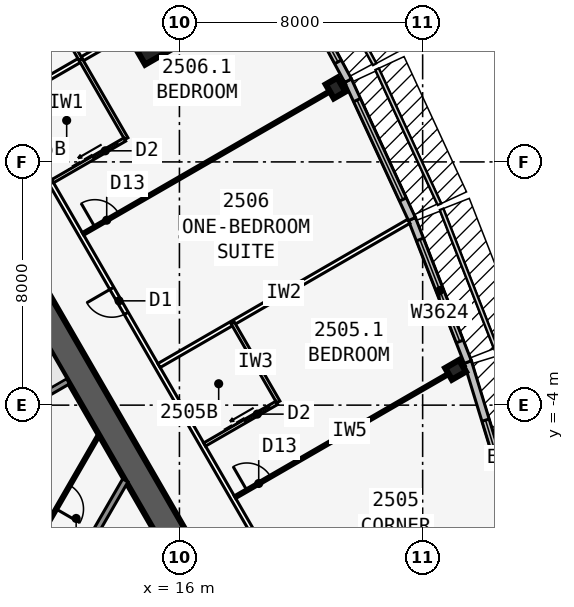
"""IFC4 building model, lengths in metres.
Left out: names, types, materials, properties, quantities, classifications, styles, units other than length and angle.
Written with IfcOpenShell. Run it as: python <this file> out.ifc"""

import sys

from ifc_helpers import new_model, si_unit, direction, frame, frame_2d, origin, origin_2d, place, context, subcontext, project, spatial, rectangle, i_section, extrude, element, fill, save


model = new_model("IFC4")
c1 = context("Model", 3, precision=1e-05, world=origin(), true_north=direction((0.0, 1.0)))
c2 = subcontext(c1, "Body", "Model", "MODEL_VIEW")
j1 = project(units=[si_unit("LENGTHUNIT", "METRE"), si_unit("PLANEANGLEUNIT", "RADIAN")], contexts=[c1])
p1 = place(None, origin())
s1 = spatial("IfcSite", under=j1, at=p1, CompositionType="ELEMENT")
p2 = place(p1, origin())
s2 = spatial("IfcBuilding", under=s1, at=p2, CompositionType="ELEMENT")
p3 = place(p2, frame((0.0, 0.0, 96.5)))
s3 = spatial("IfcBuildingStorey", under=s2, at=p3, CompositionType="ELEMENT", Elevation=96.5)
p4 = place(p3, frame((16.5, -9.526, 0.0), z_axis=(0.0, 0.0, 1.0), x_axis=(-0.499999749417, 0.866025548458, 0.0)))
e1 = element("IfcWall", 1, at=p4, inside=s3, PredefinedType="SHEAR", context=c2, shape_type="SweptSolid", body=[
    extrude(rectangle(XDim=33.0, YDim=0.9, at=frame_2d((16.5, 0.0))), origin(), (0.0, 0.0, 1.0), 3.4),
])
p5 = place(p4, frame((14.15, 0.0, 0.0)))
e2 = element("IfcOpeningElement", 2, at=p5, cuts=e1, PredefinedType="OPENING", context=c2, shape_type="SweptSolid", body=[
    extrude(rectangle(XDim=1.8, YDim=2.13, at=frame_2d((0.9, 1.065))), frame((0.0, 0.46, 0.0), z_axis=(0.0, -1.0, 0.0), x_axis=(1.0, 0.0, 0.0)), (0.0, 0.0, 1.0), 0.92),
])
p6 = place(p4, frame((12.6, 0.0, 0.0)))
e3 = element("IfcOpeningElement", 3, at=p6, cuts=e1, PredefinedType="OPENING", context=c2, shape_type="SweptSolid", body=[
    extrude(rectangle(XDim=1.0, YDim=2.13, at=frame_2d((0.5, 1.065))), frame((0.0, 0.46, 0.0), z_axis=(0.0, -1.0, 0.0), x_axis=(1.0, 0.0, 0.0)), (0.0, 0.0, 1.0), 0.92),
])
p7 = place(p3, frame((9.629, -4.775, 0.0), z_axis=(0.0, 0.0, 1.0), x_axis=(0.866022959057, 0.500004234368, 0.0)))
e4 = element("IfcWall", 4, at=p7, inside=s3, PredefinedType="SOLIDWALL", context=c2, shape_type="SweptSolid", body=[
    extrude(rectangle(XDim=3.125, YDim=0.2, at=frame_2d((1.562, 0.0))), origin(), (0.0, 0.0, 1.0), 3.235),
])
for number, where, z_axis, x_axis in (
    (5, (25.083, -2.839, 0.0), (0.0, 0.0, 1.0), (-0.5, 0.866, 0.0)),
    (6, (21.137, 6.43, 0.0), (0.0, 0.0, 1.0), (0.866, 0.5, 0.0)),
):
    element("IfcColumn", number, at=place(p3, frame(where, z_axis=z_axis, x_axis=x_axis)), inside=s3, PredefinedType="COLUMN", context=c2, shape_type="SweptSolid", body=[
        extrude(i_section(OverallWidth=0.442, OverallDepth=0.531, WebThickness=0.066, FlangeThickness=0.106, at=origin_2d()), origin(), (0.0, 0.0, 1.0), 3.4),
    ])
p8 = place(p3, frame((15.312, 8.84, 0.0), z_axis=(0.0, 0.0, 1.0), x_axis=(0.866025403784, 0.5, 0.0)))
e7 = element("IfcColumn", 7, at=p8, inside=s3, PredefinedType="COLUMN", context=c2, shape_type="SweptSolid", body=[
    extrude(rectangle(XDim=2.4, YDim=2.4, at=origin_2d()), origin(), (0.0, 0.0, 1.0), 3.4),
])
p9 = place(p3, frame((27.88, -10.429, 0.0), z_axis=(0.0, 0.0, 1.0), x_axis=(-0.2919790669, 0.956424709265, 0.0)))
e8 = element("IfcWall", 8, at=p9, inside=s3, PredefinedType="STANDARD", context=c2, shape_type="SweptSolid", body=[
    extrude(rectangle(XDim=8.211, YDim=0.25, at=frame_2d((4.105, 0.0))), origin(), (0.0, 0.0, 1.0), 3.235),
])
p10 = place(p9, frame((2.006, 0.0, 0.45)))
e9 = element("IfcOpeningElement", 9, at=p10, cuts=e8, PredefinedType="OPENING", context=c2, shape_type="SweptSolid", body=[
    extrude(rectangle(XDim=4.2, YDim=2.4, at=frame_2d((2.1, 1.2))), frame((0.0, 0.135, 0.0), z_axis=(0.0, -1.0, 0.0), x_axis=(1.0, 0.0, 0.0)), (0.0, 0.0, 1.0), 0.27),
])
p11 = place(p3, frame((25.486, -2.584, 0.0), z_axis=(0.0, 0.0, 1.0), x_axis=(-0.364013463868, 0.931393685894, 0.0)))
e10 = element("IfcWall", 10, at=p11, inside=s3, PredefinedType="STANDARD", context=c2, shape_type="SweptSolid", body=[
    extrude(rectangle(XDim=5.058, YDim=0.25, at=frame_2d((2.529, 0.0))), origin(), (0.0, 0.0, 1.0), 3.235),
])
p12 = place(p11, frame((0.729, 0.0, 0.45)))
e11 = element("IfcOpeningElement", 11, at=p12, cuts=e10, PredefinedType="OPENING", context=c2, shape_type="SweptSolid", body=[
    extrude(rectangle(XDim=3.6, YDim=2.4, at=frame_2d((1.8, 1.2))), frame((0.0, 0.135, 0.0), z_axis=(0.0, -1.0, 0.0), x_axis=(1.0, 0.0, 0.0)), (0.0, 0.0, 1.0), 0.27),
])
p13 = place(p3, frame((23.648, 2.119, 0.0), z_axis=(0.0, 0.0, 1.0), x_axis=(-0.419203100754, 0.907892482796, 0.0)))
e12 = element("IfcWall", 12, at=p13, inside=s3, PredefinedType="STANDARD", context=c2, shape_type="SweptSolid", body=[
    extrude(rectangle(XDim=5.021, YDim=0.25, at=frame_2d((2.51, 0.0))), origin(), (0.0, 0.0, 1.0), 3.235),
])
p14 = place(p13, frame((0.71, 0.0, 0.45)))
e13 = element("IfcOpeningElement", 13, at=p14, cuts=e12, PredefinedType="OPENING", context=c2, shape_type="SweptSolid", body=[
    extrude(rectangle(XDim=3.6, YDim=2.4, at=frame_2d((1.8, 1.2))), frame((0.0, 0.135, 0.0), z_axis=(0.0, -1.0, 0.0), x_axis=(1.0, 0.0, 0.0)), (0.0, 0.0, 1.0), 0.27),
])
p15 = place(p3, frame((21.547, 6.671, 0.0), z_axis=(0.0, 0.0, 1.0), x_axis=(-0.473412820489, 0.880840678782, 0.0)))
e14 = element("IfcWall", 14, at=p15, inside=s3, PredefinedType="STANDARD", context=c2, shape_type="SweptSolid", body=[
    extrude(rectangle(XDim=5.002, YDim=0.25, at=frame_2d((2.501, 0.0))), origin(), (0.0, 0.0, 1.0), 3.235),
])
p16 = place(p15, frame((0.701, 0.0, 0.45)))
e15 = element("IfcOpeningElement", 15, at=p16, cuts=e14, PredefinedType="OPENING", context=c2, shape_type="SweptSolid", body=[
    extrude(rectangle(XDim=3.6, YDim=2.4, at=frame_2d((1.8, 1.2))), frame((0.0, 0.135, 0.0), z_axis=(0.0, -1.0, 0.0), x_axis=(1.0, 0.0, 0.0)), (0.0, 0.0, 1.0), 0.27),
])
p17 = place(p3, frame((20.027, -10.985, 0.0), z_axis=(0.0, 0.0, 1.0), x_axis=(-0.500001677587, 0.866024435227, 0.0)))
e16 = element("IfcWall", 16, at=p17, inside=s3, PredefinedType="PARTITIONING", context=c2, shape_type="SweptSolid", body=[
    extrude(rectangle(XDim=39.054, YDim=0.15, at=frame_2d((19.527, 0.0))), origin(), (0.0, 0.0, 1.0), 3.235),
])
p18 = place(p17, frame((1.558, 0.0, 0.0)))
e17 = element("IfcOpeningElement", 17, at=p18, cuts=e16, PredefinedType="OPENING", context=c2, shape_type="SweptSolid", body=[
    extrude(rectangle(XDim=0.95, YDim=2.13, at=frame_2d((0.475, 1.065))), frame((0.0, 0.085, 0.0), z_axis=(0.0, -1.0, 0.0), x_axis=(1.0, 0.0, 0.0)), (0.0, 0.0, 1.0), 0.17),
])
p19 = place(p17, frame((11.552, 0.0, 0.0)))
e18 = element("IfcOpeningElement", 18, at=p19, cuts=e16, PredefinedType="OPENING", context=c2, shape_type="SweptSolid", body=[
    extrude(rectangle(XDim=0.95, YDim=2.13, at=frame_2d((0.475, 1.065))), frame((0.0, 0.085, 0.0), z_axis=(0.0, -1.0, 0.0), x_axis=(1.0, 0.0, 0.0)), (0.0, 0.0, 1.0), 0.17),
])
p20 = place(p17, frame((22.752, 0.0, 0.0)))
e19 = element("IfcOpeningElement", 19, at=p20, cuts=e16, PredefinedType="OPENING", context=c2, shape_type="SweptSolid", body=[
    extrude(rectangle(XDim=0.95, YDim=2.13, at=frame_2d((0.475, 1.065))), frame((0.0, 0.085, 0.0), z_axis=(0.0, -1.0, 0.0), x_axis=(1.0, 0.0, 0.0)), (0.0, 0.0, 1.0), 0.17),
])
p21 = place(p17, frame((36.546, 0.0, 0.0)))
e20 = element("IfcOpeningElement", 20, at=p21, cuts=e16, PredefinedType="OPENING", context=c2, shape_type="SweptSolid", body=[
    extrude(rectangle(XDim=0.95, YDim=2.13, at=frame_2d((0.475, 1.065))), frame((0.0, 0.085, 0.0), z_axis=(0.0, -1.0, 0.0), x_axis=(1.0, 0.0, 0.0)), (0.0, 0.0, 1.0), 0.17),
])
p22 = place(p3, frame((17.829, -7.027, 0.0), z_axis=(0.0, 0.0, 1.0), x_axis=(0.866032659912, 0.499987431809, 0.0)))
e21 = element("IfcWall", 21, at=p22, inside=s3, PredefinedType="PARTITIONING", context=c2, shape_type="SweptSolid", body=[
    extrude(rectangle(XDim=8.72, YDim=0.1, at=frame_2d((4.36, 0.0))), origin(), (0.0, 0.0, 1.0), 2.389),
])
p23 = place(p22, frame((0.45, 0.0, 0.0)))
e22 = element("IfcOpeningElement", 22, at=p23, cuts=e21, PredefinedType="OPENING", context=c2, shape_type="SweptSolid", body=[
    extrude(rectangle(XDim=0.9, YDim=2.13, at=frame_2d((0.45, 1.065))), frame((0.0, 0.06, 0.0), z_axis=(0.0, -1.0, 0.0), x_axis=(1.0, 0.0, 0.0)), (0.0, 0.0, 1.0), 0.12),
])
p24 = place(p3, frame((15.329, -2.697, 0.0), z_axis=(0.0, 0.0, 1.0), x_axis=(0.866018409083, 0.500012114982, 0.0)))
e23 = element("IfcWall", 23, at=p24, inside=s3, PredefinedType="PARTITIONING", context=c2, shape_type="SweptSolid", body=[
    extrude(rectangle(XDim=9.485, YDim=0.15, at=frame_2d((4.742, 0.0))), origin(), (0.0, 0.0, 1.0), 2.389),
])
p25 = place(p3, frame((12.829, 1.633, 0.0), z_axis=(0.0, 0.0, 1.0), x_axis=(0.866026934769, 0.499997348248, 0.0)))
e24 = element("IfcWall", 24, at=p25, inside=s3, PredefinedType="PARTITIONING", context=c2, shape_type="SweptSolid", body=[
    extrude(rectangle(XDim=9.943, YDim=0.1, at=frame_2d((4.971, 0.0))), origin(), (0.0, 0.0, 1.0), 2.389),
])
p26 = place(p25, frame((0.45, 0.0, 0.0)))
e25 = element("IfcOpeningElement", 25, at=p26, cuts=e24, PredefinedType="OPENING", context=c2, shape_type="SweptSolid", body=[
    extrude(rectangle(XDim=0.9, YDim=2.13, at=frame_2d((0.45, 1.065))), frame((0.0, 0.06, 0.0), z_axis=(0.0, -1.0, 0.0), x_axis=(1.0, 0.0, 0.0)), (0.0, 0.0, 1.0), 0.12),
])
p27 = place(p3, frame((10.329, 5.963, 0.0), z_axis=(0.0, 0.0, 1.0), x_axis=(0.866021688545, 0.500006434927, 0.0)))
e26 = element("IfcWall", 26, at=p27, inside=s3, PredefinedType="PARTITIONING", context=c2, shape_type="SweptSolid", body=[
    extrude(rectangle(XDim=10.096, YDim=0.15, at=frame_2d((5.048, 0.0))), origin(), (0.0, 0.0, 1.0), 2.389),
])
p28 = place(p3, frame((19.253, -3.895, 0.0), z_axis=(0.0, 0.0, 1.0), x_axis=(-0.499990139034, 0.866031096941, 0.0)))
e27 = element("IfcWall", 27, at=p28, inside=s3, PredefinedType="PLUMBINGWALL", context=c2, shape_type="SweptSolid", body=[
    extrude(rectangle(XDim=3.0, YDim=0.12, at=frame_2d((1.5, 0.0))), origin(), (0.0, 0.0, 1.0), 3.235),
])
p29 = place(p3, frame((16.829, -5.295, 0.0), z_axis=(0.0, 0.0, 1.0), x_axis=(0.866035715982, 0.499982138324, 0.0)))
e28 = element("IfcWall", 28, at=p29, inside=s3, PredefinedType="PLUMBINGWALL", context=c2, shape_type="SweptSolid", body=[
    extrude(rectangle(XDim=2.74, YDim=0.12, at=frame_2d((1.37, 0.0))), origin(), (0.0, 0.0, 1.0), 3.235),
])
p30 = place(p29, frame((1.55, 0.0, 0.0)))
e29 = element("IfcOpeningElement", 29, at=p30, cuts=e28, PredefinedType="OPENING", context=c2, shape_type="SweptSolid", body=[
    extrude(rectangle(XDim=0.9, YDim=2.13, at=frame_2d((0.45, 1.065))), frame((0.0, 0.07, 0.0), z_axis=(0.0, -1.0, 0.0), x_axis=(1.0, 0.0, 0.0)), (0.0, 0.0, 1.0), 0.14),
])
p31 = place(p3, frame((14.253, 4.765, 0.0), z_axis=(0.0, 0.0, 1.0), x_axis=(-0.50002537861, 0.866010750942, 0.0)))
e30 = element("IfcWall", 30, at=p31, inside=s3, PredefinedType="PLUMBINGWALL", context=c2, shape_type="SweptSolid", body=[
    extrude(rectangle(XDim=3.0, YDim=0.12, at=frame_2d((1.5, 0.0))), origin(), (0.0, 0.0, 1.0), 3.235),
])
p32 = place(p3, frame((11.829, 3.365, 0.0), z_axis=(0.0, 0.0, 1.0), x_axis=(0.865997131366, 0.500048966069, 0.0)))
e31 = element("IfcWall", 31, at=p32, inside=s3, PredefinedType="PLUMBINGWALL", context=c2, shape_type="SweptSolid", body=[
    extrude(rectangle(XDim=2.74, YDim=0.12, at=frame_2d((1.37, 0.0))), origin(), (0.0, 0.0, 1.0), 3.235),
])
p33 = place(p32, frame((1.55, 0.0, 0.0)))
e32 = element("IfcOpeningElement", 32, at=p33, cuts=e31, PredefinedType="OPENING", context=c2, shape_type="SweptSolid", body=[
    extrude(rectangle(XDim=0.9, YDim=2.13, at=frame_2d((0.45, 1.065))), frame((0.0, 0.07, 0.0), z_axis=(0.0, -1.0, 0.0), x_axis=(1.0, 0.0, 0.0)), (0.0, 0.0, 1.0), 0.14),
])
p34 = place(p3, frame((12.753, 7.363, 0.0), z_axis=(0.0, 0.0, 1.0), x_axis=(-0.499990139034, 0.866031096941, 0.0)))
e33 = element("IfcWall", 33, at=p34, inside=s3, PredefinedType="PLUMBINGWALL", context=c2, shape_type="SweptSolid", body=[
    extrude(rectangle(XDim=3.0, YDim=0.12, at=frame_2d((1.5, 0.0))), origin(), (0.0, 0.0, 1.0), 3.235),
])
p35 = place(p3, frame((14.219, -6.476, 0.0), z_axis=(0.0, 0.0, 1.0), x_axis=(-0.499952404951, -0.866052881055, 0.0)))
e34 = element("IfcWall", 34, at=p35, inside=s3, PredefinedType="SOLIDWALL", context=c2, shape_type="SweptSolid", body=[
    extrude(rectangle(XDim=3.002, YDim=0.2, at=frame_2d((1.501, 0.0))), origin(), (0.0, 0.0, 1.0), 3.235),
])
p36 = place(p3, frame((13.354, -4.976, 0.0), z_axis=(0.0, 0.0, 1.0), x_axis=(-0.499999210213, -0.866025859768, 0.0)))
e35 = element("IfcWall", 35, at=p36, inside=s3, PredefinedType="PARTITIONING", context=c2, shape_type="SweptSolid", body=[
    extrude(rectangle(XDim=4.734, YDim=0.1, at=frame_2d((2.367, 0.0))), origin(), (0.0, 0.0, 1.0), 3.235),
])
p37 = place(p36, frame((1.917, 0.0, 0.0)))
e36 = element("IfcOpeningElement", 36, at=p37, cuts=e35, PredefinedType="OPENING", context=c2, shape_type="SweptSolid", body=[
    extrude(rectangle(XDim=0.9, YDim=2.13, at=frame_2d((0.45, 1.065))), frame((0.0, 0.06, 0.0), z_axis=(0.0, -1.0, 0.0), x_axis=(1.0, 0.0, 0.0)), (0.0, 0.0, 1.0), 0.12),
])
p38 = place(p10, origin())
e37 = element("IfcWindow", 37, at=p38, inside=s3, PartitioningType="SINGLE_PANEL", PredefinedType="WINDOW", context=c2, shape_type="SweptSolid", body=[
    extrude(rectangle(XDim=4.2, YDim=2.4, at=frame_2d((2.1, 1.2))), frame((0.0, 0.03, 0.0), z_axis=(0.0, -1.0, 0.0), x_axis=(1.0, 0.0, 0.0)), (0.0, 0.0, 1.0), 0.06),
])
fill(e9, e37)
p39 = place(p12, origin())
e38 = element("IfcWindow", 38, at=p39, inside=s3, PartitioningType="SINGLE_PANEL", PredefinedType="WINDOW", context=c2, shape_type="SweptSolid", body=[
    extrude(rectangle(XDim=3.6, YDim=2.4, at=frame_2d((1.8, 1.2))), frame((0.0, 0.03, 0.0), z_axis=(0.0, -1.0, 0.0), x_axis=(1.0, 0.0, 0.0)), (0.0, 0.0, 1.0), 0.06),
])
fill(e11, e38)
p40 = place(p14, origin())
e39 = element("IfcWindow", 39, at=p40, inside=s3, PartitioningType="SINGLE_PANEL", PredefinedType="WINDOW", context=c2, shape_type="SweptSolid", body=[
    extrude(rectangle(XDim=3.6, YDim=2.4, at=frame_2d((1.8, 1.2))), frame((0.0, 0.03, 0.0), z_axis=(0.0, -1.0, 0.0), x_axis=(1.0, 0.0, 0.0)), (0.0, 0.0, 1.0), 0.06),
])
fill(e13, e39)
p41 = place(p16, origin())
e40 = element("IfcWindow", 40, at=p41, inside=s3, PartitioningType="SINGLE_PANEL", PredefinedType="WINDOW", context=c2, shape_type="SweptSolid", body=[
    extrude(rectangle(XDim=3.6, YDim=2.4, at=frame_2d((1.8, 1.2))), frame((0.0, 0.03, 0.0), z_axis=(0.0, -1.0, 0.0), x_axis=(1.0, 0.0, 0.0)), (0.0, 0.0, 1.0), 0.06),
])
fill(e15, e40)
p42 = place(p23, origin())
e41 = element("IfcDoor", 41, at=p42, inside=s3, OperationType="SINGLE_SWING_LEFT", PredefinedType="DOOR", context=c2, shape_type="SweptSolid", body=[
    extrude(rectangle(XDim=0.9, YDim=2.13, at=frame_2d((0.45, 1.065))), frame((0.0, 0.025, 0.0), z_axis=(0.0, -1.0, 0.0), x_axis=(1.0, 0.0, 0.0)), (0.0, 0.0, 1.0), 0.05),
])
fill(e22, e41)
p43 = place(p26, origin())
e42 = element("IfcDoor", 42, at=p43, inside=s3, OperationType="SINGLE_SWING_LEFT", PredefinedType="DOOR", context=c2, shape_type="SweptSolid", body=[
    extrude(rectangle(XDim=0.9, YDim=2.13, at=frame_2d((0.45, 1.065))), frame((0.0, 0.025, 0.0), z_axis=(0.0, -1.0, 0.0), x_axis=(1.0, 0.0, 0.0)), (0.0, 0.0, 1.0), 0.05),
])
fill(e25, e42)
p44 = place(p30, origin())
e43 = element("IfcDoor", 43, at=p44, inside=s3, OperationType="SLIDING_TO_LEFT", PredefinedType="DOOR", context=c2, shape_type="SweptSolid", body=[
    extrude(rectangle(XDim=0.9, YDim=2.13, at=frame_2d((0.45, 1.065))), frame((0.0, 0.025, 0.0), z_axis=(0.0, -1.0, 0.0), x_axis=(1.0, 0.0, 0.0)), (0.0, 0.0, 1.0), 0.05),
])
fill(e29, e43)
p45 = place(p19, origin())
e44 = element("IfcDoor", 44, at=p45, inside=s3, OperationType="SINGLE_SWING_RIGHT", PredefinedType="DOOR", context=c2, shape_type="SweptSolid", body=[
    extrude(rectangle(XDim=0.95, YDim=2.13, at=frame_2d((0.475, 1.065))), frame((0.0, 0.025, 0.0), z_axis=(0.0, -1.0, 0.0), x_axis=(1.0, 0.0, 0.0)), (0.0, 0.0, 1.0), 0.05),
])
fill(e18, e44)
p46 = place(p33, origin())
e45 = element("IfcDoor", 45, at=p46, inside=s3, OperationType="SLIDING_TO_LEFT", PredefinedType="DOOR", context=c2, shape_type="SweptSolid", body=[
    extrude(rectangle(XDim=0.9, YDim=2.13, at=frame_2d((0.45, 1.065))), frame((0.0, 0.025, 0.0), z_axis=(0.0, -1.0, 0.0), x_axis=(1.0, 0.0, 0.0)), (0.0, 0.0, 1.0), 0.05),
])
fill(e32, e45)
p47 = place(p37, origin())
e46 = element("IfcDoor", 46, at=p47, inside=s3, OperationType="SINGLE_SWING_RIGHT", PredefinedType="DOOR", context=c2, shape_type="SweptSolid", body=[
    extrude(rectangle(XDim=0.9, YDim=2.13, at=frame_2d((0.45, 1.065))), frame((0.0, 0.025, 0.0), z_axis=(0.0, -1.0, 0.0), x_axis=(1.0, 0.0, 0.0)), (0.0, 0.0, 1.0), 0.05),
])
fill(e36, e46)
save(model, sys.argv[1])
